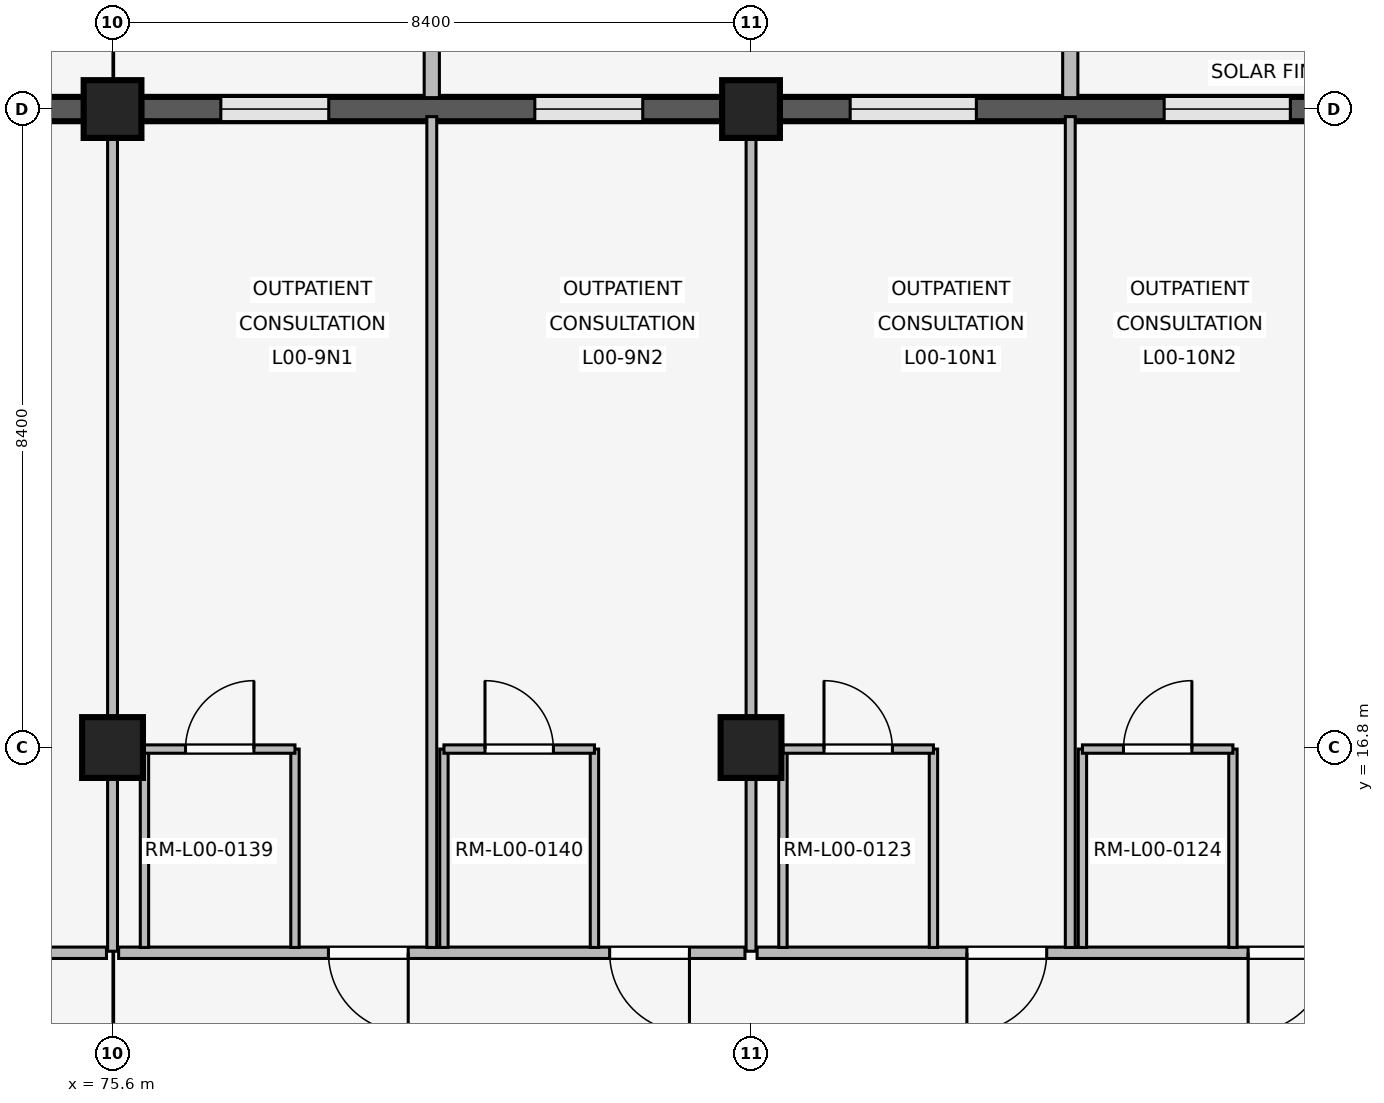
"""IFC4 building model, lengths in metres.
Left out: names, types, materials, properties, quantities, classifications, styles, units other than length and angle.
Written with IfcOpenShell. Run it as: python <this file> out.ifc"""

import sys

from ifc_helpers import new_model, si_unit, direction, frame, frame_2d, origin, origin_2d, place, context, subcontext, project, spatial, rectangle, extrude, element, fill, save


model = new_model("IFC4")
c1 = context("Model", 3, precision=1e-05, world=origin(), true_north=direction((0.0, 1.0)))
c2 = subcontext(c1, "Body", "Model", "MODEL_VIEW")
j1 = project(units=[si_unit("LENGTHUNIT", "METRE"), si_unit("PLANEANGLEUNIT", "RADIAN")], contexts=[c1])
p1 = place(None, origin())
s1 = spatial("IfcSite", under=j1, at=p1, CompositionType="ELEMENT")
p2 = place(p1, origin())
s2 = spatial("IfcBuilding", under=s1, at=p2, CompositionType="ELEMENT")
p3 = place(p2, origin())
s3 = spatial("IfcBuildingStorey", under=s2, at=p3, CompositionType="ELEMENT", Elevation=0.0)
p4 = place(p3, frame((75.6, 16.8, 0.0), z_axis=(0.0, 0.0, 1.0), x_axis=(1.0, 0.0, 0.0)))
e1 = element("IfcColumn", 1, at=p4, inside=s3, PredefinedType="COLUMN", context=c2, shape_type="SweptSolid", body=[
    extrude(rectangle(XDim=0.8, YDim=0.8, at=origin_2d()), origin(), (0.0, 0.0, 1.0), 4.8),
])
p5 = place(p3, frame((75.6, 25.2, 0.0), z_axis=(0.0, 0.0, 1.0), x_axis=(1.0, 0.0, 0.0)))
e2 = element("IfcColumn", 2, at=p5, inside=s3, PredefinedType="COLUMN", context=c2, shape_type="SweptSolid", body=[
    extrude(rectangle(XDim=0.76, YDim=0.76, at=origin_2d()), origin(), (0.0, 0.0, 1.0), 4.8),
])
p6 = place(p3, frame((84.0, 16.8, 0.0), z_axis=(0.0, 0.0, 1.0), x_axis=(1.0, 0.0, 0.0)))
e3 = element("IfcColumn", 3, at=p6, inside=s3, PredefinedType="COLUMN", context=c2, shape_type="SweptSolid", body=[
    extrude(rectangle(XDim=0.8, YDim=0.8, at=origin_2d()), origin(), (0.0, 0.0, 1.0), 4.8),
])
p7 = place(p3, frame((84.0, 25.2, 0.0), z_axis=(0.0, 0.0, 1.0), x_axis=(1.0, 0.0, 0.0)))
e4 = element("IfcColumn", 4, at=p7, inside=s3, PredefinedType="COLUMN", context=c2, shape_type="SweptSolid", body=[
    extrude(rectangle(XDim=0.76, YDim=0.76, at=origin_2d()), origin(), (0.0, 0.0, 1.0), 4.8),
])
p8 = place(p3, frame((67.575, 25.2, 0.0), z_axis=(0.0, 0.0, 1.0), x_axis=(1.0, 0.0, 0.0)))
e5 = element("IfcWall", 5, at=p8, inside=s3, PredefinedType="SOLIDWALL", context=c2, shape_type="SweptSolid", body=[
    extrude(rectangle(XDim=7.65, YDim=0.32, at=frame_2d((3.825, 0.0))), origin(), (0.0, 0.0, 1.0), 3.82),
])
p9 = place(p8, frame((1.02, 0.0, 0.85)))
e6 = element("IfcOpeningElement", 6, at=p9, cuts=e5, PredefinedType="OPENING", context=c2, shape_type="SweptSolid", body=[
    extrude(rectangle(XDim=1.48, YDim=1.6, at=frame_2d((0.74, 0.8))), frame((0.0, 0.17, 0.0), z_axis=(0.0, -1.0, 0.0), x_axis=(1.0, 0.0, 0.0)), (0.0, 0.0, 1.0), 0.34),
])
p10 = place(p8, frame((5.15, 0.0, 0.85)))
e7 = element("IfcOpeningElement", 7, at=p10, cuts=e5, PredefinedType="OPENING", context=c2, shape_type="SweptSolid", body=[
    extrude(rectangle(XDim=1.48, YDim=1.6, at=frame_2d((0.74, 0.8))), frame((0.0, 0.17, 0.0), z_axis=(0.0, -1.0, 0.0), x_axis=(1.0, 0.0, 0.0)), (0.0, 0.0, 1.0), 0.34),
])
p11 = place(p3, frame((75.975, 25.2, 0.0), z_axis=(0.0, 0.0, 1.0), x_axis=(1.0, 0.0, 0.0)))
e8 = element("IfcWall", 8, at=p11, inside=s3, PredefinedType="SOLIDWALL", context=c2, shape_type="SweptSolid", body=[
    extrude(rectangle(XDim=7.65, YDim=0.32, at=frame_2d((3.825, 0.0))), origin(), (0.0, 0.0, 1.0), 3.82),
])
p12 = place(p11, frame((1.05, 0.0, 0.85)))
e9 = element("IfcOpeningElement", 9, at=p12, cuts=e8, PredefinedType="OPENING", context=c2, shape_type="SweptSolid", body=[
    extrude(rectangle(XDim=1.42, YDim=1.45, at=frame_2d((0.71, 0.725))), frame((0.0, 0.17, 0.0), z_axis=(0.0, -1.0, 0.0), x_axis=(1.0, 0.0, 0.0)), (0.0, 0.0, 1.0), 0.34),
])
p13 = place(p11, frame((5.18, 0.0, 0.85)))
e10 = element("IfcOpeningElement", 10, at=p13, cuts=e8, PredefinedType="OPENING", context=c2, shape_type="SweptSolid", body=[
    extrude(rectangle(XDim=1.42, YDim=1.45, at=frame_2d((0.71, 0.725))), frame((0.0, 0.17, 0.0), z_axis=(0.0, -1.0, 0.0), x_axis=(1.0, 0.0, 0.0)), (0.0, 0.0, 1.0), 0.34),
])
p14 = place(p3, frame((79.8, 25.35, 0.0), z_axis=(0.0, 0.0, 1.0), x_axis=(0.0, 1.0, 0.0)))
e11 = element("IfcWall", 11, at=p14, inside=s3, PredefinedType="ELEMENTEDWALL", context=c2, shape_type="SweptSolid", body=[
    extrude(rectangle(XDim=0.85, YDim=0.2, at=frame_2d((0.425, 0.0))), origin(), (0.0, 0.0, 1.0), 3.8),
])
p15 = place(p3, frame((84.375, 25.2, 0.0), z_axis=(0.0, 0.0, 1.0), x_axis=(1.0, 0.0, 0.0)))
e12 = element("IfcWall", 12, at=p15, inside=s3, PredefinedType="SOLIDWALL", context=c2, shape_type="SweptSolid", body=[
    extrude(rectangle(XDim=7.65, YDim=0.32, at=frame_2d((3.825, 0.0))), origin(), (0.0, 0.0, 1.0), 3.82),
])
p16 = place(p15, frame((0.929, 0.0, 0.85)))
e13 = element("IfcOpeningElement", 13, at=p16, cuts=e12, PredefinedType="OPENING", context=c2, shape_type="SweptSolid", body=[
    extrude(rectangle(XDim=1.66, YDim=1.95, at=frame_2d((0.83, 0.975))), frame((0.0, 0.17, 0.0), z_axis=(0.0, -1.0, 0.0), x_axis=(1.0, 0.0, 0.0)), (0.0, 0.0, 1.0), 0.34),
])
p17 = place(p15, frame((5.061, 0.0, 0.85)))
e14 = element("IfcOpeningElement", 14, at=p17, cuts=e12, PredefinedType="OPENING", context=c2, shape_type="SweptSolid", body=[
    extrude(rectangle(XDim=1.66, YDim=1.95, at=frame_2d((0.83, 0.975))), frame((0.0, 0.17, 0.0), z_axis=(0.0, -1.0, 0.0), x_axis=(1.0, 0.0, 0.0)), (0.0, 0.0, 1.0), 0.34),
])
p18 = place(p3, frame((88.2, 25.35, 0.0), z_axis=(0.0, 0.0, 1.0), x_axis=(0.0, 1.0, 0.0)))
e15 = element("IfcWall", 15, at=p18, inside=s3, PredefinedType="ELEMENTEDWALL", context=c2, shape_type="SweptSolid", body=[
    extrude(rectangle(XDim=0.85, YDim=0.2, at=frame_2d((0.425, 0.0))), origin(), (0.0, 0.0, 1.0), 3.8),
])
p19 = place(p3, frame((75.52, 14.1, 0.0), z_axis=(0.0, 0.0, 1.0), x_axis=(-1.0, 0.0, 0.0)))
e16 = element("IfcWall", 16, at=p19, inside=s3, PredefinedType="PARTITIONING", context=c2, shape_type="SweptSolid", body=[
    extrude(rectangle(XDim=8.24, YDim=0.15, at=frame_2d((4.12, 0.0))), origin(), (0.0, 0.0, 1.0), 3.8),
])
p20 = place(p19, frame((3.545, 0.0, 0.0)))
e17 = element("IfcOpeningElement", 17, at=p20, cuts=e16, PredefinedType="OPENING", context=c2, shape_type="SweptSolid", body=[
    extrude(rectangle(XDim=1.15, YDim=2.2, at=frame_2d((0.575, 1.1))), frame((0.0, 0.085, 0.0), z_axis=(0.0, -1.0, 0.0), x_axis=(1.0, 0.0, 0.0)), (0.0, 0.0, 1.0), 0.17),
])
p21 = place(p3, frame((75.6, 14.12, 0.0), z_axis=(0.0, 0.0, 1.0), x_axis=(0.0, 1.0, 0.0)))
e18 = element("IfcWall", 18, at=p21, inside=s3, PredefinedType="PARTITIONING", context=c2, shape_type="SweptSolid", body=[
    extrude(rectangle(XDim=10.94, YDim=0.13, at=frame_2d((5.47, 0.0))), origin(), (0.0, 0.0, 1.0), 3.8),
])
p22 = place(p3, frame((83.92, 14.1, 0.0), z_axis=(0.0, 0.0, 1.0), x_axis=(-1.0, 0.0, 0.0)))
e19 = element("IfcWall", 19, at=p22, inside=s3, PredefinedType="PARTITIONING", context=c2, shape_type="SweptSolid", body=[
    extrude(rectangle(XDim=8.24, YDim=0.15, at=frame_2d((4.12, 0.0))), origin(), (0.0, 0.0, 1.0), 3.8),
])
p23 = place(p22, frame((0.73, 0.0, 0.0)))
e20 = element("IfcOpeningElement", 20, at=p23, cuts=e19, PredefinedType="OPENING", context=c2, shape_type="SweptSolid", body=[
    extrude(rectangle(XDim=1.05, YDim=2.2, at=frame_2d((0.525, 1.1))), frame((0.0, 0.085, 0.0), z_axis=(0.0, -1.0, 0.0), x_axis=(1.0, 0.0, 0.0)), (0.0, 0.0, 1.0), 0.17),
])
p24 = place(p22, frame((4.43, 0.0, 0.0)))
e21 = element("IfcOpeningElement", 21, at=p24, cuts=e19, PredefinedType="OPENING", context=c2, shape_type="SweptSolid", body=[
    extrude(rectangle(XDim=1.05, YDim=2.2, at=frame_2d((0.525, 1.1))), frame((0.0, 0.085, 0.0), z_axis=(0.0, -1.0, 0.0), x_axis=(1.0, 0.0, 0.0)), (0.0, 0.0, 1.0), 0.17),
])
p25 = place(p3, frame((79.8, 14.17, 0.0), z_axis=(0.0, 0.0, 1.0), x_axis=(0.0, 1.0, 0.0)))
e22 = element("IfcWall", 22, at=p25, inside=s3, PredefinedType="PARTITIONING", context=c2, shape_type="SweptSolid", body=[
    extrude(rectangle(XDim=10.93, YDim=0.13, at=frame_2d((5.465, 0.0))), origin(), (0.0, 0.0, 1.0), 3.8),
])
for number, where, z_axis, x_axis in (
    (23, (76.02, 14.17, 0.0), (0.0, 0.0, 1.0), (0.0, 1.0, 0.0)),
    (24, (78.0, 14.17, 0.0), (0.0, 0.0, 1.0), (0.0, 1.0, 0.0)),
):
    element("IfcWall", number, at=place(p3, frame(where, z_axis=z_axis, x_axis=x_axis)), inside=s3, PredefinedType="PARTITIONING", context=c2, shape_type="SweptSolid", body=[
        extrude(rectangle(XDim=2.61, YDim=0.11, at=frame_2d((1.305, 0.0))), origin(), (0.0, 0.0, 1.0), 3.8),
    ])
p26 = place(p3, frame((76.02, 16.78, 0.0), z_axis=(0.0, 0.0, 1.0), x_axis=(1.0, 0.0, 0.0)))
e25 = element("IfcWall", 25, at=p26, inside=s3, PredefinedType="PARTITIONING", context=c2, shape_type="SweptSolid", body=[
    extrude(rectangle(XDim=1.98, YDim=0.11, at=frame_2d((0.99, 0.0))), origin(), (0.0, 0.0, 1.0), 3.8),
])
p27 = place(p26, frame((0.54, 0.0, 0.0)))
e26 = element("IfcOpeningElement", 26, at=p27, cuts=e25, PredefinedType="OPENING", context=c2, shape_type="SweptSolid", body=[
    extrude(rectangle(XDim=0.9, YDim=2.1, at=frame_2d((0.45, 1.05))), frame((0.0, 0.065, 0.0), z_axis=(0.0, -1.0, 0.0), x_axis=(1.0, 0.0, 0.0)), (0.0, 0.0, 1.0), 0.13),
])
for number, where, z_axis, x_axis in (
    (27, (79.96, 14.17, 0.0), (0.0, 0.0, 1.0), (0.0, 1.0, 0.0)),
    (28, (81.94, 14.17, 0.0), (0.0, 0.0, 1.0), (0.0, 1.0, 0.0)),
):
    element("IfcWall", number, at=place(p3, frame(where, z_axis=z_axis, x_axis=x_axis)), inside=s3, PredefinedType="PARTITIONING", context=c2, shape_type="SweptSolid", body=[
        extrude(rectangle(XDim=2.61, YDim=0.11, at=frame_2d((1.305, 0.0))), origin(), (0.0, 0.0, 1.0), 3.8),
    ])
p28 = place(p3, frame((79.96, 16.78, 0.0), z_axis=(0.0, 0.0, 1.0), x_axis=(1.0, 0.0, 0.0)))
e29 = element("IfcWall", 29, at=p28, inside=s3, PredefinedType="PARTITIONING", context=c2, shape_type="SweptSolid", body=[
    extrude(rectangle(XDim=1.98, YDim=0.11, at=frame_2d((0.99, 0.0))), origin(), (0.0, 0.0, 1.0), 3.8),
])
p29 = place(p28, frame((0.54, 0.0, 0.0)))
e30 = element("IfcOpeningElement", 30, at=p29, cuts=e29, PredefinedType="OPENING", context=c2, shape_type="SweptSolid", body=[
    extrude(rectangle(XDim=0.9, YDim=2.1, at=frame_2d((0.45, 1.05))), frame((0.0, 0.065, 0.0), z_axis=(0.0, -1.0, 0.0), x_axis=(1.0, 0.0, 0.0)), (0.0, 0.0, 1.0), 0.13),
])
p30 = place(p3, frame((84.0, 14.12, 0.0), z_axis=(0.0, 0.0, 1.0), x_axis=(0.0, 1.0, 0.0)))
e31 = element("IfcWall", 31, at=p30, inside=s3, PredefinedType="PARTITIONING", context=c2, shape_type="SweptSolid", body=[
    extrude(rectangle(XDim=10.94, YDim=0.13, at=frame_2d((5.47, 0.0))), origin(), (0.0, 0.0, 1.0), 3.8),
])
p31 = place(p3, frame((92.04, 14.1, 0.0), z_axis=(0.0, 0.0, 1.0), x_axis=(-1.0, 0.0, 0.0)))
e32 = element("IfcWall", 32, at=p31, inside=s3, PredefinedType="PARTITIONING", context=c2, shape_type="SweptSolid", body=[
    extrude(rectangle(XDim=7.96, YDim=0.15, at=frame_2d((3.98, 0.0))), origin(), (0.0, 0.0, 1.0), 3.8),
])
p32 = place(p31, frame((0.45, 0.0, 0.0)))
e33 = element("IfcOpeningElement", 33, at=p32, cuts=e32, PredefinedType="OPENING", context=c2, shape_type="SweptSolid", body=[
    extrude(rectangle(XDim=1.05, YDim=2.2, at=frame_2d((0.525, 1.1))), frame((0.0, 0.085, 0.0), z_axis=(0.0, -1.0, 0.0), x_axis=(1.0, 0.0, 0.0)), (0.0, 0.0, 1.0), 0.17),
])
p33 = place(p31, frame((4.15, 0.0, 0.0)))
e34 = element("IfcOpeningElement", 34, at=p33, cuts=e32, PredefinedType="OPENING", context=c2, shape_type="SweptSolid", body=[
    extrude(rectangle(XDim=1.05, YDim=2.2, at=frame_2d((0.525, 1.1))), frame((0.0, 0.085, 0.0), z_axis=(0.0, -1.0, 0.0), x_axis=(1.0, 0.0, 0.0)), (0.0, 0.0, 1.0), 0.17),
])
p34 = place(p3, frame((88.2, 14.17, 0.0), z_axis=(0.0, 0.0, 1.0), x_axis=(0.0, 1.0, 0.0)))
e35 = element("IfcWall", 35, at=p34, inside=s3, PredefinedType="PARTITIONING", context=c2, shape_type="SweptSolid", body=[
    extrude(rectangle(XDim=10.93, YDim=0.13, at=frame_2d((5.465, 0.0))), origin(), (0.0, 0.0, 1.0), 3.8),
])
for number, where, z_axis, x_axis in (
    (36, (84.42, 14.17, 0.0), (0.0, 0.0, 1.0), (0.0, 1.0, 0.0)),
    (37, (86.4, 14.17, 0.0), (0.0, 0.0, 1.0), (0.0, 1.0, 0.0)),
):
    element("IfcWall", number, at=place(p3, frame(where, z_axis=z_axis, x_axis=x_axis)), inside=s3, PredefinedType="PARTITIONING", context=c2, shape_type="SweptSolid", body=[
        extrude(rectangle(XDim=2.61, YDim=0.11, at=frame_2d((1.305, 0.0))), origin(), (0.0, 0.0, 1.0), 3.8),
    ])
p35 = place(p3, frame((84.42, 16.78, 0.0), z_axis=(0.0, 0.0, 1.0), x_axis=(1.0, 0.0, 0.0)))
e38 = element("IfcWall", 38, at=p35, inside=s3, PredefinedType="PARTITIONING", context=c2, shape_type="SweptSolid", body=[
    extrude(rectangle(XDim=1.98, YDim=0.11, at=frame_2d((0.99, 0.0))), origin(), (0.0, 0.0, 1.0), 3.8),
])
p36 = place(p35, frame((0.54, 0.0, 0.0)))
e39 = element("IfcOpeningElement", 39, at=p36, cuts=e38, PredefinedType="OPENING", context=c2, shape_type="SweptSolid", body=[
    extrude(rectangle(XDim=0.9, YDim=2.1, at=frame_2d((0.45, 1.05))), frame((0.0, 0.065, 0.0), z_axis=(0.0, -1.0, 0.0), x_axis=(1.0, 0.0, 0.0)), (0.0, 0.0, 1.0), 0.13),
])
for number, where, z_axis, x_axis in (
    (40, (88.36, 14.17, 0.0), (0.0, 0.0, 1.0), (0.0, 1.0, 0.0)),
    (41, (90.34, 14.17, 0.0), (0.0, 0.0, 1.0), (0.0, 1.0, 0.0)),
):
    element("IfcWall", number, at=place(p3, frame(where, z_axis=z_axis, x_axis=x_axis)), inside=s3, PredefinedType="PARTITIONING", context=c2, shape_type="SweptSolid", body=[
        extrude(rectangle(XDim=2.61, YDim=0.11, at=frame_2d((1.305, 0.0))), origin(), (0.0, 0.0, 1.0), 3.8),
    ])
p37 = place(p3, frame((88.36, 16.78, 0.0), z_axis=(0.0, 0.0, 1.0), x_axis=(1.0, 0.0, 0.0)))
e42 = element("IfcWall", 42, at=p37, inside=s3, PredefinedType="PARTITIONING", context=c2, shape_type="SweptSolid", body=[
    extrude(rectangle(XDim=1.98, YDim=0.11, at=frame_2d((0.99, 0.0))), origin(), (0.0, 0.0, 1.0), 3.8),
])
p38 = place(p37, frame((0.54, 0.0, 0.0)))
e43 = element("IfcOpeningElement", 43, at=p38, cuts=e42, PredefinedType="OPENING", context=c2, shape_type="SweptSolid", body=[
    extrude(rectangle(XDim=0.9, YDim=2.1, at=frame_2d((0.45, 1.05))), frame((0.0, 0.065, 0.0), z_axis=(0.0, -1.0, 0.0), x_axis=(1.0, 0.0, 0.0)), (0.0, 0.0, 1.0), 0.13),
])
p39 = place(p12, origin())
e44 = element("IfcWindow", 44, at=p39, inside=s3, PartitioningType="SINGLE_PANEL", PredefinedType="WINDOW", context=c2, shape_type="SweptSolid", body=[
    extrude(rectangle(XDim=1.42, YDim=1.45, at=frame_2d((0.71, 0.725))), frame((0.0, 0.03, 0.0), z_axis=(0.0, -1.0, 0.0), x_axis=(1.0, 0.0, 0.0)), (0.0, 0.0, 1.0), 0.06),
])
fill(e9, e44)
p40 = place(p13, origin())
e45 = element("IfcWindow", 45, at=p40, inside=s3, PartitioningType="SINGLE_PANEL", PredefinedType="WINDOW", context=c2, shape_type="SweptSolid", body=[
    extrude(rectangle(XDim=1.42, YDim=1.45, at=frame_2d((0.71, 0.725))), frame((0.0, 0.03, 0.0), z_axis=(0.0, -1.0, 0.0), x_axis=(1.0, 0.0, 0.0)), (0.0, 0.0, 1.0), 0.06),
])
fill(e10, e45)
p41 = place(p16, origin())
e46 = element("IfcWindow", 46, at=p41, inside=s3, PartitioningType="SINGLE_PANEL", PredefinedType="WINDOW", context=c2, shape_type="SweptSolid", body=[
    extrude(rectangle(XDim=1.66, YDim=1.95, at=frame_2d((0.83, 0.975))), frame((0.0, 0.03, 0.0), z_axis=(0.0, -1.0, 0.0), x_axis=(1.0, 0.0, 0.0)), (0.0, 0.0, 1.0), 0.06),
])
fill(e13, e46)
p42 = place(p17, origin())
e47 = element("IfcWindow", 47, at=p42, inside=s3, PartitioningType="SINGLE_PANEL", PredefinedType="WINDOW", context=c2, shape_type="SweptSolid", body=[
    extrude(rectangle(XDim=1.66, YDim=1.95, at=frame_2d((0.83, 0.975))), frame((0.0, 0.03, 0.0), z_axis=(0.0, -1.0, 0.0), x_axis=(1.0, 0.0, 0.0)), (0.0, 0.0, 1.0), 0.06),
])
fill(e14, e47)
p43 = place(p23, origin())
e48 = element("IfcDoor", 48, at=p43, inside=s3, OperationType="SINGLE_SWING_LEFT", PredefinedType="DOOR", context=c2, shape_type="SweptSolid", body=[
    extrude(rectangle(XDim=1.05, YDim=2.2, at=frame_2d((0.525, 1.1))), frame((0.0, 0.025, 0.0), z_axis=(0.0, -1.0, 0.0), x_axis=(1.0, 0.0, 0.0)), (0.0, 0.0, 1.0), 0.05),
])
fill(e20, e48)
p44 = place(p24, origin())
e49 = element("IfcDoor", 49, at=p44, inside=s3, OperationType="SINGLE_SWING_LEFT", PredefinedType="DOOR", context=c2, shape_type="SweptSolid", body=[
    extrude(rectangle(XDim=1.05, YDim=2.2, at=frame_2d((0.525, 1.1))), frame((0.0, 0.025, 0.0), z_axis=(0.0, -1.0, 0.0), x_axis=(1.0, 0.0, 0.0)), (0.0, 0.0, 1.0), 0.05),
])
fill(e21, e49)
p45 = place(p27, origin())
e50 = element("IfcDoor", 50, at=p45, inside=s3, OperationType="SINGLE_SWING_RIGHT", PredefinedType="DOOR", context=c2, shape_type="SweptSolid", body=[
    extrude(rectangle(XDim=0.9, YDim=2.1, at=frame_2d((0.45, 1.05))), frame((0.0, 0.025, 0.0), z_axis=(0.0, -1.0, 0.0), x_axis=(1.0, 0.0, 0.0)), (0.0, 0.0, 1.0), 0.05),
])
fill(e26, e50)
p46 = place(p29, origin())
e51 = element("IfcDoor", 51, at=p46, inside=s3, OperationType="SINGLE_SWING_LEFT", PredefinedType="DOOR", context=c2, shape_type="SweptSolid", body=[
    extrude(rectangle(XDim=0.9, YDim=2.1, at=frame_2d((0.45, 1.05))), frame((0.0, 0.025, 0.0), z_axis=(0.0, -1.0, 0.0), x_axis=(1.0, 0.0, 0.0)), (0.0, 0.0, 1.0), 0.05),
])
fill(e30, e51)
p47 = place(p32, origin())
e52 = element("IfcDoor", 52, at=p47, inside=s3, OperationType="SINGLE_SWING_RIGHT", PredefinedType="DOOR", context=c2, shape_type="SweptSolid", body=[
    extrude(rectangle(XDim=1.05, YDim=2.2, at=frame_2d((0.525, 1.1))), frame((0.0, 0.025, 0.0), z_axis=(0.0, -1.0, 0.0), x_axis=(1.0, 0.0, 0.0)), (0.0, 0.0, 1.0), 0.05),
])
fill(e33, e52)
p48 = place(p33, origin())
e53 = element("IfcDoor", 53, at=p48, inside=s3, OperationType="SINGLE_SWING_RIGHT", PredefinedType="DOOR", context=c2, shape_type="SweptSolid", body=[
    extrude(rectangle(XDim=1.05, YDim=2.2, at=frame_2d((0.525, 1.1))), frame((0.0, 0.025, 0.0), z_axis=(0.0, -1.0, 0.0), x_axis=(1.0, 0.0, 0.0)), (0.0, 0.0, 1.0), 0.05),
])
fill(e34, e53)
p49 = place(p36, origin())
e54 = element("IfcDoor", 54, at=p49, inside=s3, OperationType="SINGLE_SWING_LEFT", PredefinedType="DOOR", context=c2, shape_type="SweptSolid", body=[
    extrude(rectangle(XDim=0.9, YDim=2.1, at=frame_2d((0.45, 1.05))), frame((0.0, 0.025, 0.0), z_axis=(0.0, -1.0, 0.0), x_axis=(1.0, 0.0, 0.0)), (0.0, 0.0, 1.0), 0.05),
])
fill(e39, e54)
p50 = place(p38, origin())
e55 = element("IfcDoor", 55, at=p50, inside=s3, OperationType="SINGLE_SWING_RIGHT", PredefinedType="DOOR", context=c2, shape_type="SweptSolid", body=[
    extrude(rectangle(XDim=0.9, YDim=2.1, at=frame_2d((0.45, 1.05))), frame((0.0, 0.025, 0.0), z_axis=(0.0, -1.0, 0.0), x_axis=(1.0, 0.0, 0.0)), (0.0, 0.0, 1.0), 0.05),
])
fill(e43, e55)
save(model, sys.argv[1])
